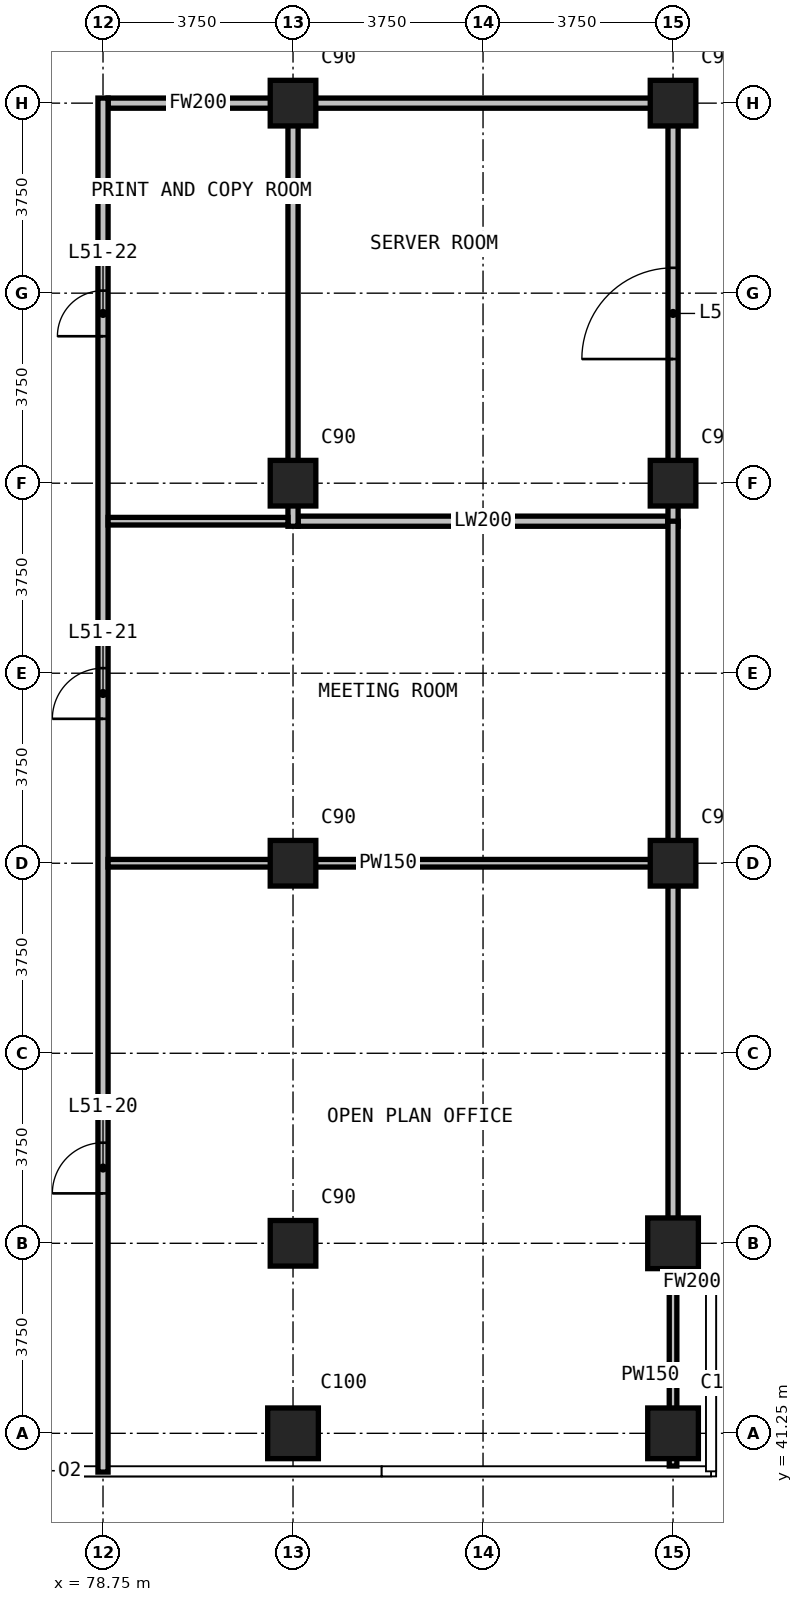
"""IFC4 building model, lengths in metres.
Left out: names, types, materials, properties, quantities, classifications, styles, units other than length and angle.
Written with IfcOpenShell. Run it as: python <this file> out.ifc"""

import sys

from ifc_helpers import new_model, si_unit, direction, frame, frame_2d, origin, origin_2d, place, context, subcontext, project, spatial, rectangle, extrude, element, fill, save


model = new_model("IFC4")
c1 = context("Model", 3, precision=1e-05, world=origin(), true_north=direction((0.0, 1.0)))
c2 = subcontext(c1, "Body", "Model", "MODEL_VIEW")
j1 = project(units=[si_unit("LENGTHUNIT", "METRE"), si_unit("PLANEANGLEUNIT", "RADIAN")], contexts=[c1])
p1 = place(None, origin())
s1 = spatial("IfcSite", under=j1, at=p1, CompositionType="ELEMENT")
p2 = place(p1, origin())
s2 = spatial("IfcBuilding", under=s1, at=p2, CompositionType="ELEMENT")
p3 = place(p2, frame((0.0, 0.0, 199.5)))
s3 = spatial("IfcBuildingStorey", under=s2, at=p3, CompositionType="ELEMENT", Elevation=199.5)
p4 = place(p3, frame((82.5, 41.25, 0.0), z_axis=(0.0, 0.0, 1.0), x_axis=(1.0, 0.0, 0.0)))
e1 = element("IfcColumn", 1, at=p4, inside=s3, PredefinedType="COLUMN", context=c2, shape_type="SweptSolid", body=[
    extrude(rectangle(XDim=1.0, YDim=1.0, at=origin_2d()), origin(), (0.0, 0.0, 1.0), 3.6),
])
for number, where, z_axis, x_axis in (
    (2, (82.5, 45.0, 0.0), (0.0, 0.0, 1.0), (1.0, 0.0, 0.0)),
    (3, (82.5, 52.5, 0.0), (0.0, 0.0, 1.0), (1.0, 0.0, 0.0)),
    (4, (82.5, 60.0, 0.0), (0.0, 0.0, 1.0), (1.0, 0.0, 0.0)),
    (5, (82.5, 67.5, 0.0), (0.0, 0.0, 1.0), (1.0, 0.0, 0.0)),
):
    element("IfcColumn", number, at=place(p3, frame(where, z_axis=z_axis, x_axis=x_axis)), inside=s3, PredefinedType="COLUMN", context=c2, shape_type="SweptSolid", body=[
        extrude(rectangle(XDim=0.9, YDim=0.9, at=origin_2d()), origin(), (0.0, 0.0, 1.0), 3.6),
    ])
for number, where, z_axis, x_axis in (
    (6, (90.0, 41.25, 0.0), (0.0, 0.0, 1.0), (1.0, 0.0, 0.0)),
    (7, (90.0, 45.0, 0.0), (0.0, 0.0, 1.0), (1.0, 0.0, 0.0)),
):
    element("IfcColumn", number, at=place(p3, frame(where, z_axis=z_axis, x_axis=x_axis)), inside=s3, PredefinedType="COLUMN", context=c2, shape_type="SweptSolid", body=[
        extrude(rectangle(XDim=1.0, YDim=1.0, at=origin_2d()), origin(), (0.0, 0.0, 1.0), 3.6),
    ])
for number, where, z_axis, x_axis in (
    (8, (90.0, 52.5, 0.0), (0.0, 0.0, 1.0), (1.0, 0.0, 0.0)),
    (9, (90.0, 60.0, 0.0), (0.0, 0.0, 1.0), (1.0, 0.0, 0.0)),
    (10, (90.0, 67.5, 0.0), (0.0, 0.0, 1.0), (1.0, 0.0, 0.0)),
):
    element("IfcColumn", number, at=place(p3, frame(where, z_axis=z_axis, x_axis=x_axis)), inside=s3, PredefinedType="COLUMN", context=c2, shape_type="SweptSolid", body=[
        extrude(rectangle(XDim=0.9, YDim=0.9, at=origin_2d()), origin(), (0.0, 0.0, 1.0), 3.6),
    ])
for number, where, z_axis, x_axis in (
    (11, (82.6, 59.25, 0.0), (0.0, 0.0, 1.0), (1.0, 0.0, 0.0)),
    (12, (82.6, 67.5, 0.0), (0.0, 0.0, 1.0), (1.0, 0.0, 0.0)),
):
    element("IfcWall", number, at=place(p3, frame(where, z_axis=z_axis, x_axis=x_axis)), inside=s3, PredefinedType="PARTITIONING", context=c2, shape_type="SweptSolid", body=[
        extrude(rectangle(XDim=7.3, YDim=0.2, at=frame_2d((3.65, 0.0))), origin(), (0.0, 0.0, 1.0), 3.3),
    ])
p5 = place(p3, frame((82.5, 59.15, 0.0), z_axis=(0.0, 0.0, 1.0), x_axis=(0.0, 1.0, 0.0)))
e13 = element("IfcWall", 13, at=p5, inside=s3, PredefinedType="PARTITIONING", context=c2, shape_type="SweptSolid", body=[
    extrude(rectangle(XDim=8.45, YDim=0.2, at=frame_2d((4.225, 0.0))), origin(), (0.0, 0.0, 1.0), 3.3),
])
p6 = place(p3, frame((90.0, 59.15, 0.0), z_axis=(0.0, 0.0, 1.0), x_axis=(0.0, 1.0, 0.0)))
e14 = element("IfcWall", 14, at=p6, inside=s3, PredefinedType="PARTITIONING", context=c2, shape_type="SweptSolid", body=[
    extrude(rectangle(XDim=8.45, YDim=0.2, at=frame_2d((4.225, 0.0))), origin(), (0.0, 0.0, 1.0), 3.3),
])
p7 = place(p6, frame((3.3, 0.0, 0.0)))
e15 = element("IfcOpeningElement", 15, at=p7, cuts=e14, PredefinedType="OPENING", context=c2, shape_type="SweptSolid", body=[
    extrude(rectangle(XDim=1.8, YDim=2.4, at=frame_2d((0.9, 1.2))), frame((0.0, 0.11, 0.0), z_axis=(0.0, -1.0, 0.0), x_axis=(1.0, 0.0, 0.0)), (0.0, 0.0, 1.0), 0.22),
])
p8 = place(p3, frame((90.1, 44.235, 0.0), z_axis=(0.0, 0.0, 1.0), x_axis=(1.0, 0.0, 0.0)))
e16 = element("IfcWall", 16, at=p8, inside=s3, PredefinedType="PARTITIONING", context=c2, shape_type="SweptSolid", body=[
    extrude(rectangle(XDim=0.545, YDim=0.2, at=frame_2d((0.272, 0.0))), origin(), (0.0, 0.0, 1.0), 3.3),
])
p9 = place(p3, frame((78.85, 67.5, 0.0), z_axis=(0.0, 0.0, 1.0), x_axis=(1.0, 0.0, 0.0)))
e17 = element("IfcWall", 17, at=p9, inside=s3, PredefinedType="PARTITIONING", context=c2, shape_type="SweptSolid", body=[
    extrude(rectangle(XDim=3.55, YDim=0.2, at=frame_2d((1.775, 0.0))), origin(), (0.0, 0.0, 1.0), 3.3),
])
p10 = place(p3, frame((78.75, 40.485, 0.0), z_axis=(0.0, 0.0, 1.0), x_axis=(0.0, 1.0, 0.0)))
e18 = element("IfcWall", 18, at=p10, inside=s3, PredefinedType="PARTITIONING", context=c2, shape_type="SweptSolid", body=[
    extrude(rectangle(XDim=27.115, YDim=0.2, at=frame_2d((13.558, 0.0))), origin(), (0.0, 0.0, 1.0), 3.3),
])
p11 = place(p10, frame((5.5, 0.0, 0.0)))
e19 = element("IfcOpeningElement", 19, at=p11, cuts=e18, PredefinedType="OPENING", context=c2, shape_type="SweptSolid", body=[
    extrude(rectangle(XDim=1.0, YDim=2.2, at=frame_2d((0.5, 1.1))), frame((0.0, 0.11, 0.0), z_axis=(0.0, -1.0, 0.0), x_axis=(1.0, 0.0, 0.0)), (0.0, 0.0, 1.0), 0.22),
])
p12 = place(p10, frame((14.865, 0.0, 0.0)))
e20 = element("IfcOpeningElement", 20, at=p12, cuts=e18, PredefinedType="OPENING", context=c2, shape_type="SweptSolid", body=[
    extrude(rectangle(XDim=1.0, YDim=2.2, at=frame_2d((0.5, 1.1))), frame((0.0, 0.11, 0.0), z_axis=(0.0, -1.0, 0.0), x_axis=(1.0, 0.0, 0.0)), (0.0, 0.0, 1.0), 0.22),
])
p13 = place(p10, frame((22.415, 0.0, 0.0)))
e21 = element("IfcOpeningElement", 21, at=p13, cuts=e18, PredefinedType="OPENING", context=c2, shape_type="SweptSolid", body=[
    extrude(rectangle(XDim=0.9, YDim=2.2, at=frame_2d((0.45, 1.1))), frame((0.0, 0.11, 0.0), z_axis=(0.0, -1.0, 0.0), x_axis=(1.0, 0.0, 0.0)), (0.0, 0.0, 1.0), 0.22),
])
p14 = place(p3, frame((90.0, 44.135, 0.0), z_axis=(0.0, 0.0, 1.0), x_axis=(0.0, 1.0, 0.0)))
e22 = element("IfcWall", 22, at=p14, inside=s3, PredefinedType="PARTITIONING", context=c2, shape_type="SweptSolid", body=[
    extrude(rectangle(XDim=15.115, YDim=0.2, at=frame_2d((7.558, 0.0))), origin(), (0.0, 0.0, 1.0), 3.3),
])
p15 = place(p3, frame((78.85, 52.5, 0.0), z_axis=(0.0, 0.0, 1.0), x_axis=(1.0, 0.0, 0.0)))
e23 = element("IfcWall", 23, at=p15, inside=s3, PredefinedType="PARTITIONING", context=c2, shape_type="SweptSolid", body=[
    extrude(rectangle(XDim=11.05, YDim=0.15, at=frame_2d((5.525, 0.0))), origin(), (0.0, 0.0, 1.0), 3.3),
])
p16 = place(p3, frame((78.85, 59.25, 0.0), z_axis=(0.0, 0.0, 1.0), x_axis=(1.0, 0.0, 0.0)))
e24 = element("IfcWall", 24, at=p16, inside=s3, PredefinedType="PARTITIONING", context=c2, shape_type="SweptSolid", body=[
    extrude(rectangle(XDim=3.55, YDim=0.15, at=frame_2d((1.775, 0.0))), origin(), (0.0, 0.0, 1.0), 3.3),
])
p17 = place(p3, frame((90.0, 40.605, 0.0), z_axis=(0.0, 0.0, 1.0), x_axis=(0.0, 1.0, 0.0)))
e25 = element("IfcWall", 25, at=p17, inside=s3, PredefinedType="PARTITIONING", context=c2, shape_type="SweptSolid", body=[
    extrude(rectangle(XDim=3.6, YDim=0.15, at=frame_2d((1.8, 0.0))), origin(), (0.0, 0.0, 1.0), 3.3),
])
p18 = place(p11, origin())
e26 = element("IfcDoor", 26, at=p18, inside=s3, OperationType="SINGLE_SWING_LEFT", PredefinedType="DOOR", context=c2, shape_type="SweptSolid", body=[
    extrude(rectangle(XDim=1.0, YDim=2.2, at=frame_2d((0.5, 1.1))), frame((0.0, 0.025, 0.0), z_axis=(0.0, -1.0, 0.0), x_axis=(1.0, 0.0, 0.0)), (0.0, 0.0, 1.0), 0.05),
])
fill(e19, e26)
p19 = place(p12, origin())
e27 = element("IfcDoor", 27, at=p19, inside=s3, OperationType="SINGLE_SWING_LEFT", PredefinedType="DOOR", context=c2, shape_type="SweptSolid", body=[
    extrude(rectangle(XDim=1.0, YDim=2.2, at=frame_2d((0.5, 1.1))), frame((0.0, 0.025, 0.0), z_axis=(0.0, -1.0, 0.0), x_axis=(1.0, 0.0, 0.0)), (0.0, 0.0, 1.0), 0.05),
])
fill(e20, e27)
p20 = place(p13, origin())
e28 = element("IfcDoor", 28, at=p20, inside=s3, OperationType="SINGLE_SWING_LEFT", PredefinedType="DOOR", context=c2, shape_type="SweptSolid", body=[
    extrude(rectangle(XDim=0.9, YDim=2.2, at=frame_2d((0.45, 1.1))), frame((0.0, 0.025, 0.0), z_axis=(0.0, -1.0, 0.0), x_axis=(1.0, 0.0, 0.0)), (0.0, 0.0, 1.0), 0.05),
])
fill(e21, e28)
p21 = place(p7, origin())
e29 = element("IfcDoor", 29, at=p21, inside=s3, OperationType="DOUBLE_DOOR_SINGLE_SWING", PredefinedType="DOOR", context=c2, shape_type="SweptSolid", body=[
    extrude(rectangle(XDim=1.8, YDim=2.4, at=frame_2d((0.9, 1.2))), frame((0.0, 0.025, 0.0), z_axis=(0.0, -1.0, 0.0), x_axis=(1.0, 0.0, 0.0)), (0.0, 0.0, 1.0), 0.05),
])
fill(e15, e29)
save(model, sys.argv[1])
